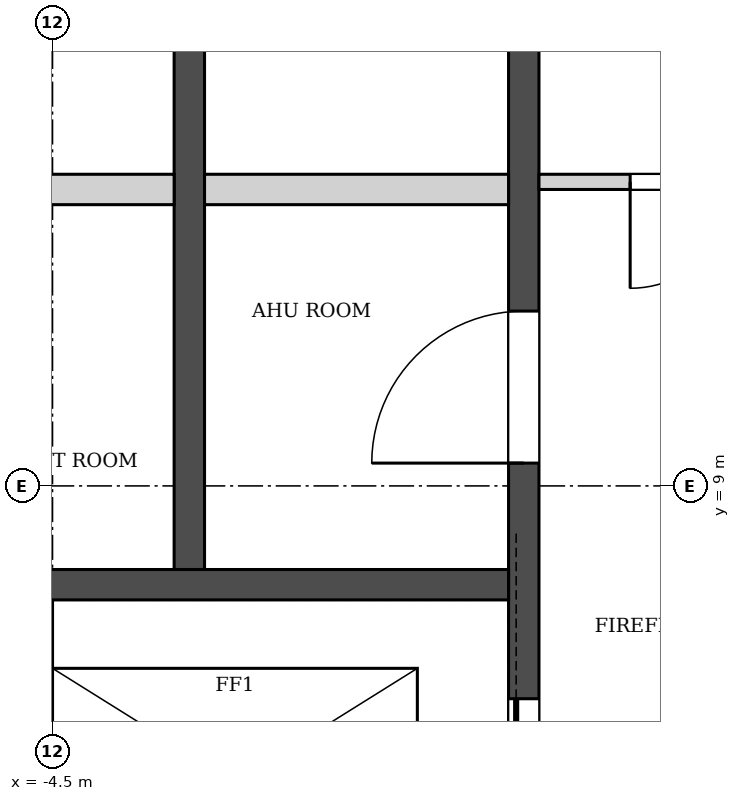
"""IFC4 building model, lengths in metres.
Left out: names, types, materials, properties, quantities, classifications, styles, units other than length and angle.
Written with IfcOpenShell. Run it as: python <this file> out.ifc"""

import sys

from ifc_helpers import new_model, si_unit, direction, frame, frame_2d, origin, place, context, subcontext, project, spatial, rectangle, extrude, element, fill, save


model = new_model("IFC4")
c1 = context("Model", 3, precision=1e-05, world=origin(), true_north=direction((0.0, 1.0)))
c2 = subcontext(c1, "Body", "Model", "MODEL_VIEW")
j1 = project(units=[si_unit("LENGTHUNIT", "METRE"), si_unit("PLANEANGLEUNIT", "RADIAN")], contexts=[c1])
p1 = place(None, origin())
s1 = spatial("IfcSite", under=j1, at=p1, CompositionType="ELEMENT")
p2 = place(p1, origin())
s2 = spatial("IfcBuilding", under=s1, at=p2, CompositionType="ELEMENT")
p3 = place(p2, frame((0.0, 0.0, 259.5)))
s3 = spatial("IfcBuildingStorey", under=s2, at=p3, CompositionType="ELEMENT", Elevation=259.5)
p4 = place(p3, frame((-4.353, 45.242, 0.0), z_axis=(0.0, 0.0, 1.0), x_axis=(-0.500000891752, -0.866024888931, 0.0)))
e1 = element("IfcWall", 1, at=p4, inside=s3, PredefinedType="SOLIDWALL", context=c2, shape_type="SweptSolid", body=[
    extrude(rectangle(XDim=43.339, YDim=0.34, at=frame_2d((21.669, 0.0))), origin(), (0.0, 0.0, 1.0), 6.8),
])
p5 = place(p3, frame((-3.6, 8.45, -0.4), z_axis=(0.0, 0.0, 1.0), x_axis=(0.0, 1.0, 0.0)))
e2 = element("IfcWall", 2, at=p5, inside=s3, PredefinedType="SOLIDWALL", context=c2, shape_type="SweptSolid", body=[
    extrude(rectangle(XDim=7.8, YDim=0.2, at=frame_2d((3.9, 0.0))), origin(), (0.0, 0.0, 1.0), 7.2),
])
p6 = place(p3, frame((-1.4, 5.85, -0.4), z_axis=(0.0, 0.0, 1.0), x_axis=(0.0, 1.0, 0.0)))
e3 = element("IfcWall", 3, at=p6, inside=s3, PredefinedType="SOLIDWALL", context=c2, shape_type="SweptSolid", body=[
    extrude(rectangle(XDim=11.75, YDim=0.2, at=frame_2d((5.875, 0.0))), origin(), (0.0, 0.0, 1.0), 7.2),
])
p7 = place(p6, frame((0.65, 0.0, 0.4)))
e4 = element("IfcOpeningElement", 4, at=p7, cuts=e3, PredefinedType="OPENING", context=c2, shape_type="SweptSolid", body=[
    extrude(rectangle(XDim=1.1, YDim=2.1, at=frame_2d((0.55, 1.05))), frame((0.0, 0.11, 0.0), z_axis=(0.0, -1.0, 0.0), x_axis=(1.0, 0.0, 0.0)), (0.0, 0.0, 1.0), 0.22),
])
p8 = place(p6, frame((3.3, 0.0, 0.4)))
e5 = element("IfcOpeningElement", 5, at=p8, cuts=e3, PredefinedType="OPENING", context=c2, shape_type="SweptSolid", body=[
    extrude(rectangle(XDim=1.0, YDim=2.1, at=frame_2d((0.5, 1.05))), frame((0.0, 0.11, 0.0), z_axis=(0.0, -1.0, 0.0), x_axis=(1.0, 0.0, 0.0)), (0.0, 0.0, 1.0), 0.22),
])
p9 = place(p6, frame((7.2, 0.0, 0.4)))
e6 = element("IfcOpeningElement", 6, at=p9, cuts=e3, PredefinedType="OPENING", context=c2, shape_type="SweptSolid", body=[
    extrude(rectangle(XDim=1.0, YDim=2.1, at=frame_2d((0.5, 1.05))), frame((0.0, 0.11, 0.0), z_axis=(0.0, -1.0, 0.0), x_axis=(1.0, 0.0, 0.0)), (0.0, 0.0, 1.0), 0.22),
])
p10 = place(p3, frame((-5.7, 8.35, -0.4), z_axis=(0.0, 0.0, 1.0), x_axis=(1.0, 0.0, 0.0)))
e7 = element("IfcWall", 7, at=p10, inside=s3, PredefinedType="SOLIDWALL", context=c2, shape_type="SweptSolid", body=[
    extrude(rectangle(XDim=4.2, YDim=0.2, at=frame_2d((2.1, 0.0))), origin(), (0.0, 0.0, 1.0), 7.2),
])
for number, where, z_axis, x_axis in (
    (8, (-5.7, 10.95, 0.0), (0.0, 0.0, 1.0), (1.0, 0.0, 0.0)),
    (9, (-3.5, 10.95, 0.0), (0.0, 0.0, 1.0), (1.0, 0.0, 0.0)),
):
    element("IfcWall", number, at=place(p3, frame(where, z_axis=z_axis, x_axis=x_axis)), inside=s3, PredefinedType="SOLIDWALL", context=c2, shape_type="SweptSolid", body=[
        extrude(rectangle(XDim=2.0, YDim=0.2, at=frame_2d((1.0, 0.0))), origin(), (0.0, 0.0, 1.0), 6.8),
    ])
p11 = place(p3, frame((-1.3, 11.0, 0.0), z_axis=(0.0, 0.0, 1.0), x_axis=(1.0, 0.0, 0.0)))
e10 = element("IfcWall", 10, at=p11, inside=s3, PredefinedType="PARTITIONING", context=c2, shape_type="SweptSolid", body=[
    extrude(rectangle(XDim=2.6, YDim=0.1, at=frame_2d((1.3, 0.0))), origin(), (0.0, 0.0, 1.0), 6.8),
])
p12 = place(p11, frame((0.6, 0.0, 0.0)))
e11 = element("IfcOpeningElement", 11, at=p12, cuts=e10, PredefinedType="OPENING", context=c2, shape_type="SweptSolid", body=[
    extrude(rectangle(XDim=1.4, YDim=2.1, at=frame_2d((0.7, 1.05))), frame((0.0, 0.06, 0.0), z_axis=(0.0, -1.0, 0.0), x_axis=(1.0, 0.0, 0.0)), (0.0, 0.0, 1.0), 0.12),
])
p13 = place(p7, origin())
e12 = element("IfcDoor", 12, at=p13, inside=s3, OperationType="SLIDING_TO_RIGHT", PredefinedType="DOOR", context=c2, shape_type="SweptSolid", body=[
    extrude(rectangle(XDim=1.1, YDim=2.1, at=frame_2d((0.55, 1.05))), frame((0.0, 0.025, 0.0), z_axis=(0.0, -1.0, 0.0), x_axis=(1.0, 0.0, 0.0)), (0.0, 0.0, 1.0), 0.05),
])
fill(e4, e12)
p14 = place(p8, origin())
e13 = element("IfcDoor", 13, at=p14, inside=s3, OperationType="SINGLE_SWING_LEFT", PredefinedType="DOOR", context=c2, shape_type="SweptSolid", body=[
    extrude(rectangle(XDim=1.0, YDim=2.1, at=frame_2d((0.5, 1.05))), frame((0.0, 0.025, 0.0), z_axis=(0.0, -1.0, 0.0), x_axis=(1.0, 0.0, 0.0)), (0.0, 0.0, 1.0), 0.05),
])
fill(e5, e13)
p15 = place(p12, frame((1.4, 0.0, 0.0), z_axis=(0.0, 0.0, 1.0), x_axis=(-1.0, 0.0, 0.0)))
e14 = element("IfcDoor", 14, at=p15, inside=s3, OperationType="DOUBLE_DOOR_SINGLE_SWING", PredefinedType="DOOR", context=c2, shape_type="SweptSolid", body=[
    extrude(rectangle(XDim=1.4, YDim=2.1, at=frame_2d((0.7, 1.05))), frame((0.0, 0.025, 0.0), z_axis=(0.0, -1.0, 0.0), x_axis=(1.0, 0.0, 0.0)), (0.0, 0.0, 1.0), 0.05),
])
fill(e11, e14)
save(model, sys.argv[1])
